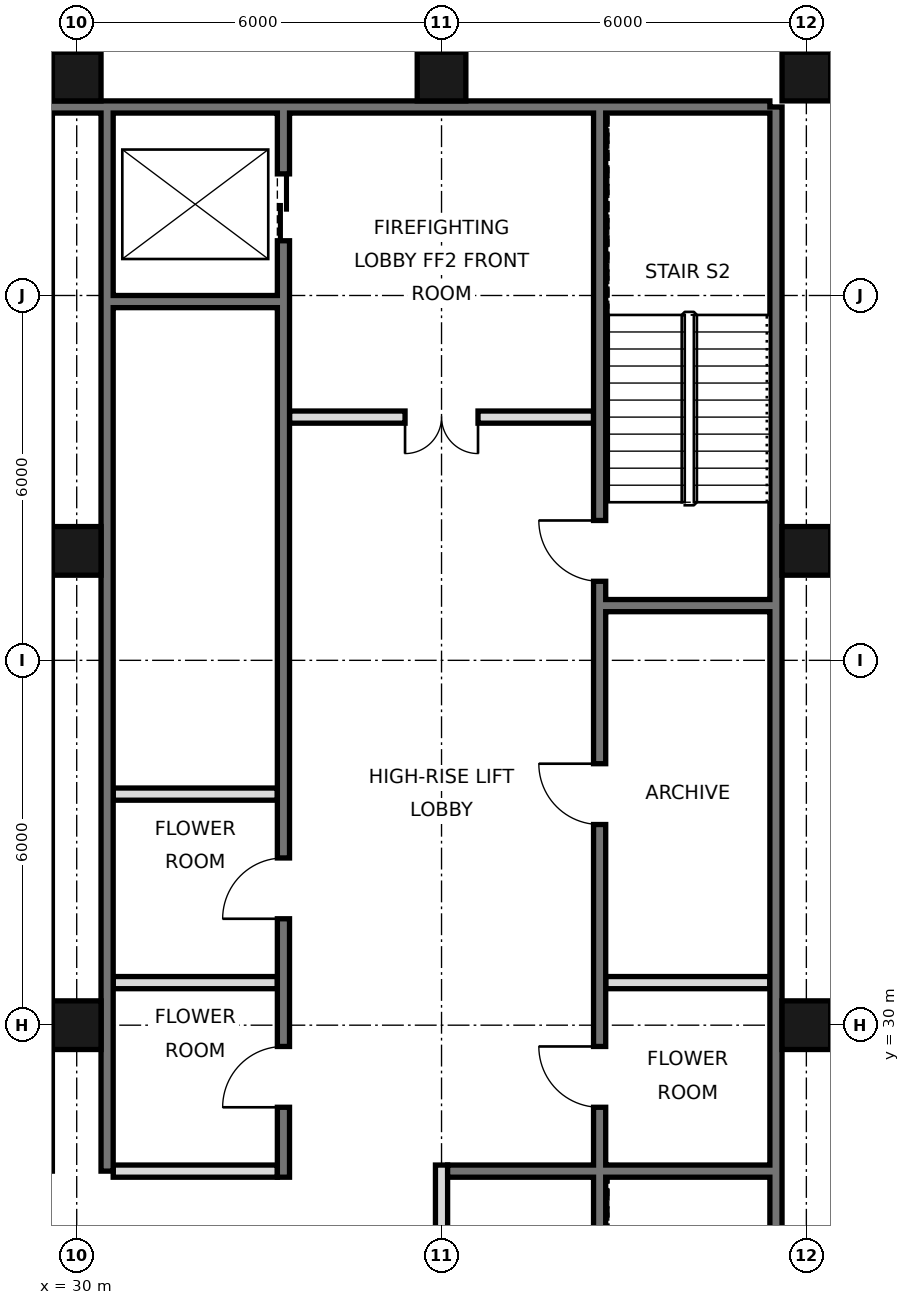
"""IFC4 building model, lengths in metres.
Left out: names, types, materials, properties, quantities, classifications, styles, units other than length and angle.
Written with IfcOpenShell. Run it as: python <this file> out.ifc"""

import sys

from ifc_helpers import new_model, si_unit, direction, frame, frame_2d, origin, origin_2d, place, context, subcontext, project, spatial, rectangle, hollow_rectangle, extrude, element, fill, save


model = new_model("IFC4")
c1 = context("Model", 3, precision=1e-05, world=origin(), true_north=direction((0.0, 1.0)))
c2 = subcontext(c1, "Body", "Model", "MODEL_VIEW")
j1 = project(units=[si_unit("LENGTHUNIT", "METRE"), si_unit("PLANEANGLEUNIT", "RADIAN")], contexts=[c1])
p1 = place(None, origin())
s1 = spatial("IfcSite", under=j1, at=p1, CompositionType="ELEMENT")
p2 = place(p1, origin())
s2 = spatial("IfcBuilding", under=s1, at=p2, CompositionType="ELEMENT")
p3 = place(p2, frame((0.0, 0.0, 337.8)))
s3 = spatial("IfcBuildingStorey", under=s2, at=p3, CompositionType="ELEMENT", Elevation=337.8)
for number, where, z_axis, x_axis in (
    (1, (30.0, 30.0, 0.0), (0.0, 0.0, 1.0), (1.0, 0.0, 0.0)),
    (2, (30.0, 37.8, 0.0), (0.0, 0.0, 1.0), (1.0, 0.0, 0.0)),
    (3, (30.0, 45.6, 0.0), (0.0, 0.0, 1.0), (1.0, 0.0, 0.0)),
    (4, (36.0, 45.6, 0.0), (0.0, 0.0, 1.0), (1.0, 0.0, 0.0)),
    (5, (42.0, 30.0, 0.0), (0.0, 0.0, 1.0), (1.0, 0.0, 0.0)),
    (6, (42.0, 37.8, 0.0), (0.0, 0.0, 1.0), (1.0, 0.0, 0.0)),
    (7, (42.0, 45.6, 0.0), (0.0, 0.0, 1.0), (1.0, 0.0, 0.0)),
):
    element("IfcColumn", number, at=place(p3, frame(where, z_axis=z_axis, x_axis=x_axis)), inside=s3, PredefinedType="COLUMN", context=c2, shape_type="SweptSolid", body=[
        extrude(hollow_rectangle(XDim=0.8, YDim=0.8, WallThickness=0.025, at=origin_2d()), origin(), (0.0, 0.0, 1.0), 4.0),
    ])
p4 = place(p3, frame((41.5, 21.6, 0.0), z_axis=(0.0, 0.0, 1.0), x_axis=(0.0, 1.0, 0.0)))
e8 = element("IfcWall", 8, at=p4, inside=s3, PredefinedType="SOLIDWALL", context=c2, shape_type="SweptSolid", body=[
    extrude(rectangle(XDim=23.5, YDim=0.2, at=frame_2d((11.75, 0.0))), origin(), (0.0, 0.0, 1.0), 3.75),
])
p5 = place(p3, frame((6.6, 45.1, 0.0), z_axis=(0.0, 0.0, 1.0), x_axis=(1.0, 0.0, 0.0)))
e9 = element("IfcWall", 9, at=p5, inside=s3, PredefinedType="SOLIDWALL", context=c2, shape_type="SweptSolid", body=[
    extrude(rectangle(XDim=34.8, YDim=0.2, at=frame_2d((17.4, 0.0))), origin(), (0.0, 0.0, 1.0), 3.75),
])
p6 = place(p3, frame((30.5, 27.6, 0.0), z_axis=(0.0, 0.0, 1.0), x_axis=(0.0, 1.0, 0.0)))
e10 = element("IfcWall", 10, at=p6, inside=s3, PredefinedType="SOLIDWALL", context=c2, shape_type="SweptSolid", body=[
    extrude(rectangle(XDim=17.5, YDim=0.2, at=frame_2d((8.75, 0.0))), origin(), (0.0, 0.0, 1.0), 3.75),
])
p7 = place(p3, frame((33.4, 27.5, 0.0), z_axis=(0.0, 0.0, 1.0), x_axis=(0.0, 1.0, 0.0)))
e11 = element("IfcWall", 11, at=p7, inside=s3, PredefinedType="SOLIDWALL", context=c2, shape_type="SweptSolid", body=[
    extrude(rectangle(XDim=17.5, YDim=0.2, at=frame_2d((8.75, 0.0))), origin(), (0.0, 0.0, 1.0), 3.75),
])
p8 = place(p7, frame((15.4, 0.0, 0.0)))
e12 = element("IfcOpeningElement", 12, at=p8, cuts=e11, PredefinedType="OPENING", context=c2, shape_type="SweptSolid", body=[
    extrude(rectangle(XDim=1.1, YDim=2.1, at=frame_2d((0.55, 1.05))), frame((0.0, 0.11, 0.0), z_axis=(0.0, -1.0, 0.0), x_axis=(1.0, 0.0, 0.0)), (0.0, 0.0, 1.0), 0.22),
])
p9 = place(p7, frame((1.15, 0.0, 0.0)))
e13 = element("IfcOpeningElement", 13, at=p9, cuts=e11, PredefinedType="OPENING", context=c2, shape_type="SweptSolid", body=[
    extrude(rectangle(XDim=1.0, YDim=2.1, at=frame_2d((0.5, 1.05))), frame((0.0, 0.11, 0.0), z_axis=(0.0, -1.0, 0.0), x_axis=(1.0, 0.0, 0.0)), (0.0, 0.0, 1.0), 0.22),
])
p10 = place(p7, frame((4.25, 0.0, 0.0)))
e14 = element("IfcOpeningElement", 14, at=p10, cuts=e11, PredefinedType="OPENING", context=c2, shape_type="SweptSolid", body=[
    extrude(rectangle(XDim=1.0, YDim=2.1, at=frame_2d((0.5, 1.05))), frame((0.0, 0.11, 0.0), z_axis=(0.0, -1.0, 0.0), x_axis=(1.0, 0.0, 0.0)), (0.0, 0.0, 1.0), 0.22),
])
p11 = place(p3, frame((36.0, 21.6, 0.0), z_axis=(0.0, 0.0, 1.0), x_axis=(0.0, 1.0, 0.0)))
e15 = element("IfcWall", 15, at=p11, inside=s3, PredefinedType="PARTITIONING", context=c2, shape_type="SweptSolid", body=[
    extrude(rectangle(XDim=6.1, YDim=0.2, at=frame_2d((3.05, 0.0))), origin(), (0.0, 0.0, 1.0), 3.75),
])
p12 = place(p3, frame((38.6, 21.6, 0.0), z_axis=(0.0, 0.0, 1.0), x_axis=(0.0, 1.0, 0.0)))
e16 = element("IfcWall", 16, at=p12, inside=s3, PredefinedType="SOLIDWALL", context=c2, shape_type="SweptSolid", body=[
    extrude(rectangle(XDim=23.4, YDim=0.2, at=frame_2d((11.7, 0.0))), origin(), (0.0, 0.0, 1.0), 3.75),
])
p13 = place(p12, frame((7.05, 0.0, 0.0)))
e17 = element("IfcOpeningElement", 17, at=p13, cuts=e16, PredefinedType="OPENING", context=c2, shape_type="SweptSolid", body=[
    extrude(rectangle(XDim=1.0, YDim=2.1, at=frame_2d((0.5, 1.05))), frame((0.0, 0.11, 0.0), z_axis=(0.0, -1.0, 0.0), x_axis=(1.0, 0.0, 0.0)), (0.0, 0.0, 1.0), 0.22),
])
p14 = place(p12, frame((11.7, 0.0, 0.0)))
e18 = element("IfcOpeningElement", 18, at=p14, cuts=e16, PredefinedType="OPENING", context=c2, shape_type="SweptSolid", body=[
    extrude(rectangle(XDim=1.0, YDim=2.1, at=frame_2d((0.5, 1.05))), frame((0.0, 0.11, 0.0), z_axis=(0.0, -1.0, 0.0), x_axis=(1.0, 0.0, 0.0)), (0.0, 0.0, 1.0), 0.22),
])
p15 = place(p12, frame((15.7, 0.0, 0.0)))
e19 = element("IfcOpeningElement", 19, at=p15, cuts=e16, PredefinedType="OPENING", context=c2, shape_type="SweptSolid", body=[
    extrude(rectangle(XDim=1.0, YDim=2.1, at=frame_2d((0.5, 1.05))), frame((0.0, 0.11, 0.0), z_axis=(0.0, -1.0, 0.0), x_axis=(1.0, 0.0, 0.0)), (0.0, 0.0, 1.0), 0.22),
])
p16 = place(p12, frame((0.175, 0.0, 0.0)))
e20 = element("IfcOpeningElement", 20, at=p16, cuts=e16, PredefinedType="OPENING", context=c2, shape_type="SweptSolid", body=[
    extrude(rectangle(XDim=0.9, YDim=2.1, at=frame_2d((0.45, 1.05))), frame((0.0, 0.11, 0.0), z_axis=(0.0, -1.0, 0.0), x_axis=(1.0, 0.0, 0.0)), (0.0, 0.0, 1.0), 0.22),
])
p17 = place(p3, frame((30.6, 27.6, 0.0), z_axis=(0.0, 0.0, 1.0), x_axis=(1.0, 0.0, 0.0)))
e21 = element("IfcWall", 21, at=p17, inside=s3, PredefinedType="PARTITIONING", context=c2, shape_type="SweptSolid", body=[
    extrude(rectangle(XDim=2.7, YDim=0.2, at=frame_2d((1.35, 0.0))), origin(), (0.0, 0.0, 1.0), 3.75),
])
p18 = place(p3, frame((36.1, 27.6, 0.0), z_axis=(0.0, 0.0, 1.0), x_axis=(1.0, 0.0, 0.0)))
e22 = element("IfcWall", 22, at=p18, inside=s3, PredefinedType="SOLIDWALL", context=c2, shape_type="SweptSolid", body=[
    extrude(rectangle(XDim=5.3, YDim=0.2, at=frame_2d((2.65, 0.0))), origin(), (0.0, 0.0, 1.0), 3.75),
])
for number, where, z_axis, x_axis in (
    (23, (30.6, 30.7, 0.0), (0.0, 0.0, 1.0), (1.0, 0.0, 0.0)),
    (24, (38.7, 30.7, 0.0), (0.0, 0.0, 1.0), (1.0, 0.0, 0.0)),
    (25, (30.6, 33.8, 0.0), (0.0, 0.0, 1.0), (1.0, 0.0, 0.0)),
):
    element("IfcWall", number, at=place(p3, frame(where, z_axis=z_axis, x_axis=x_axis)), inside=s3, PredefinedType="PARTITIONING", context=c2, shape_type="SweptSolid", body=[
        extrude(rectangle(XDim=2.7, YDim=0.2, at=frame_2d((1.35, 0.0))), origin(), (0.0, 0.0, 1.0), 3.75),
    ])
p19 = place(p3, frame((38.7, 36.9, 0.0), z_axis=(0.0, 0.0, 1.0), x_axis=(1.0, 0.0, 0.0)))
e26 = element("IfcWall", 26, at=p19, inside=s3, PredefinedType="SOLIDWALL", context=c2, shape_type="SweptSolid", body=[
    extrude(rectangle(XDim=2.7, YDim=0.2, at=frame_2d((1.35, 0.0))), origin(), (0.0, 0.0, 1.0), 3.75),
])
p20 = place(p3, frame((33.5, 40.0, 0.0), z_axis=(0.0, 0.0, 1.0), x_axis=(1.0, 0.0, 0.0)))
e27 = element("IfcWall", 27, at=p20, inside=s3, PredefinedType="PARTITIONING", context=c2, shape_type="SweptSolid", body=[
    extrude(rectangle(XDim=5.0, YDim=0.2, at=frame_2d((2.5, 0.0))), origin(), (0.0, 0.0, 1.0), 3.75),
])
p21 = place(p20, frame((1.9, 0.0, 0.0)))
e28 = element("IfcOpeningElement", 28, at=p21, cuts=e27, PredefinedType="OPENING", context=c2, shape_type="SweptSolid", body=[
    extrude(rectangle(XDim=1.2, YDim=2.1, at=frame_2d((0.6, 1.05))), frame((0.0, 0.11, 0.0), z_axis=(0.0, -1.0, 0.0), x_axis=(1.0, 0.0, 0.0)), (0.0, 0.0, 1.0), 0.22),
])
p22 = place(p3, frame((30.6, 41.9, 0.0), z_axis=(0.0, 0.0, 1.0), x_axis=(1.0, 0.0, 0.0)))
e29 = element("IfcWall", 29, at=p22, inside=s3, PredefinedType="SOLIDWALL", context=c2, shape_type="SweptSolid", body=[
    extrude(rectangle(XDim=2.7, YDim=0.2, at=frame_2d((1.35, 0.0))), origin(), (0.0, 0.0, 1.0), 3.75),
])
p23 = place(p21, frame((1.2, 0.0, 0.0), z_axis=(0.0, 0.0, 1.0), x_axis=(-1.0, 0.0, 0.0)))
e30 = element("IfcDoor", 30, at=p23, inside=s3, OperationType="DOUBLE_DOOR_SINGLE_SWING", PredefinedType="DOOR", context=c2, shape_type="SweptSolid", body=[
    extrude(rectangle(XDim=1.2, YDim=2.1, at=frame_2d((0.6, 1.05))), frame((0.0, 0.025, 0.0), z_axis=(0.0, -1.0, 0.0), x_axis=(1.0, 0.0, 0.0)), (0.0, 0.0, 1.0), 0.05),
])
fill(e28, e30)
p24 = place(p8, origin())
e31 = element("IfcDoor", 31, at=p24, inside=s3, OperationType="DOUBLE_DOOR_SLIDING", PredefinedType="DOOR", context=c2, shape_type="SweptSolid", body=[
    extrude(rectangle(XDim=1.1, YDim=2.1, at=frame_2d((0.55, 1.05))), frame((0.0, 0.025, 0.0), z_axis=(0.0, -1.0, 0.0), x_axis=(1.0, 0.0, 0.0)), (0.0, 0.0, 1.0), 0.05),
])
fill(e12, e31)
p25 = place(p13, frame((1.0, 0.0, 0.0), z_axis=(0.0, 0.0, 1.0), x_axis=(-1.0, 0.0, 0.0)))
e32 = element("IfcDoor", 32, at=p25, inside=s3, OperationType="SINGLE_SWING_LEFT", PredefinedType="DOOR", context=c2, shape_type="SweptSolid", body=[
    extrude(rectangle(XDim=1.0, YDim=2.1, at=frame_2d((0.5, 1.05))), frame((0.0, 0.025, 0.0), z_axis=(0.0, -1.0, 0.0), x_axis=(1.0, 0.0, 0.0)), (0.0, 0.0, 1.0), 0.05),
])
fill(e17, e32)
p26 = place(p14, frame((1.0, 0.0, 0.0), z_axis=(0.0, 0.0, 1.0), x_axis=(-1.0, 0.0, 0.0)))
e33 = element("IfcDoor", 33, at=p26, inside=s3, OperationType="SINGLE_SWING_LEFT", PredefinedType="DOOR", context=c2, shape_type="SweptSolid", body=[
    extrude(rectangle(XDim=1.0, YDim=2.1, at=frame_2d((0.5, 1.05))), frame((0.0, 0.025, 0.0), z_axis=(0.0, -1.0, 0.0), x_axis=(1.0, 0.0, 0.0)), (0.0, 0.0, 1.0), 0.05),
])
fill(e18, e33)
p27 = place(p9, origin())
e34 = element("IfcDoor", 34, at=p27, inside=s3, OperationType="SINGLE_SWING_LEFT", PredefinedType="DOOR", context=c2, shape_type="SweptSolid", body=[
    extrude(rectangle(XDim=1.0, YDim=2.1, at=frame_2d((0.5, 1.05))), frame((0.0, 0.025, 0.0), z_axis=(0.0, -1.0, 0.0), x_axis=(1.0, 0.0, 0.0)), (0.0, 0.0, 1.0), 0.05),
])
fill(e13, e34)
p28 = place(p10, origin())
e35 = element("IfcDoor", 35, at=p28, inside=s3, OperationType="SINGLE_SWING_LEFT", PredefinedType="DOOR", context=c2, shape_type="SweptSolid", body=[
    extrude(rectangle(XDim=1.0, YDim=2.1, at=frame_2d((0.5, 1.05))), frame((0.0, 0.025, 0.0), z_axis=(0.0, -1.0, 0.0), x_axis=(1.0, 0.0, 0.0)), (0.0, 0.0, 1.0), 0.05),
])
fill(e14, e35)
p29 = place(p15, frame((1.0, 0.0, 0.0), z_axis=(0.0, 0.0, 1.0), x_axis=(-1.0, 0.0, 0.0)))
e36 = element("IfcDoor", 36, at=p29, inside=s3, OperationType="SINGLE_SWING_LEFT", PredefinedType="DOOR", context=c2, shape_type="SweptSolid", body=[
    extrude(rectangle(XDim=1.0, YDim=2.1, at=frame_2d((0.5, 1.05))), frame((0.0, 0.025, 0.0), z_axis=(0.0, -1.0, 0.0), x_axis=(1.0, 0.0, 0.0)), (0.0, 0.0, 1.0), 0.05),
])
fill(e19, e36)
save(model, sys.argv[1])
